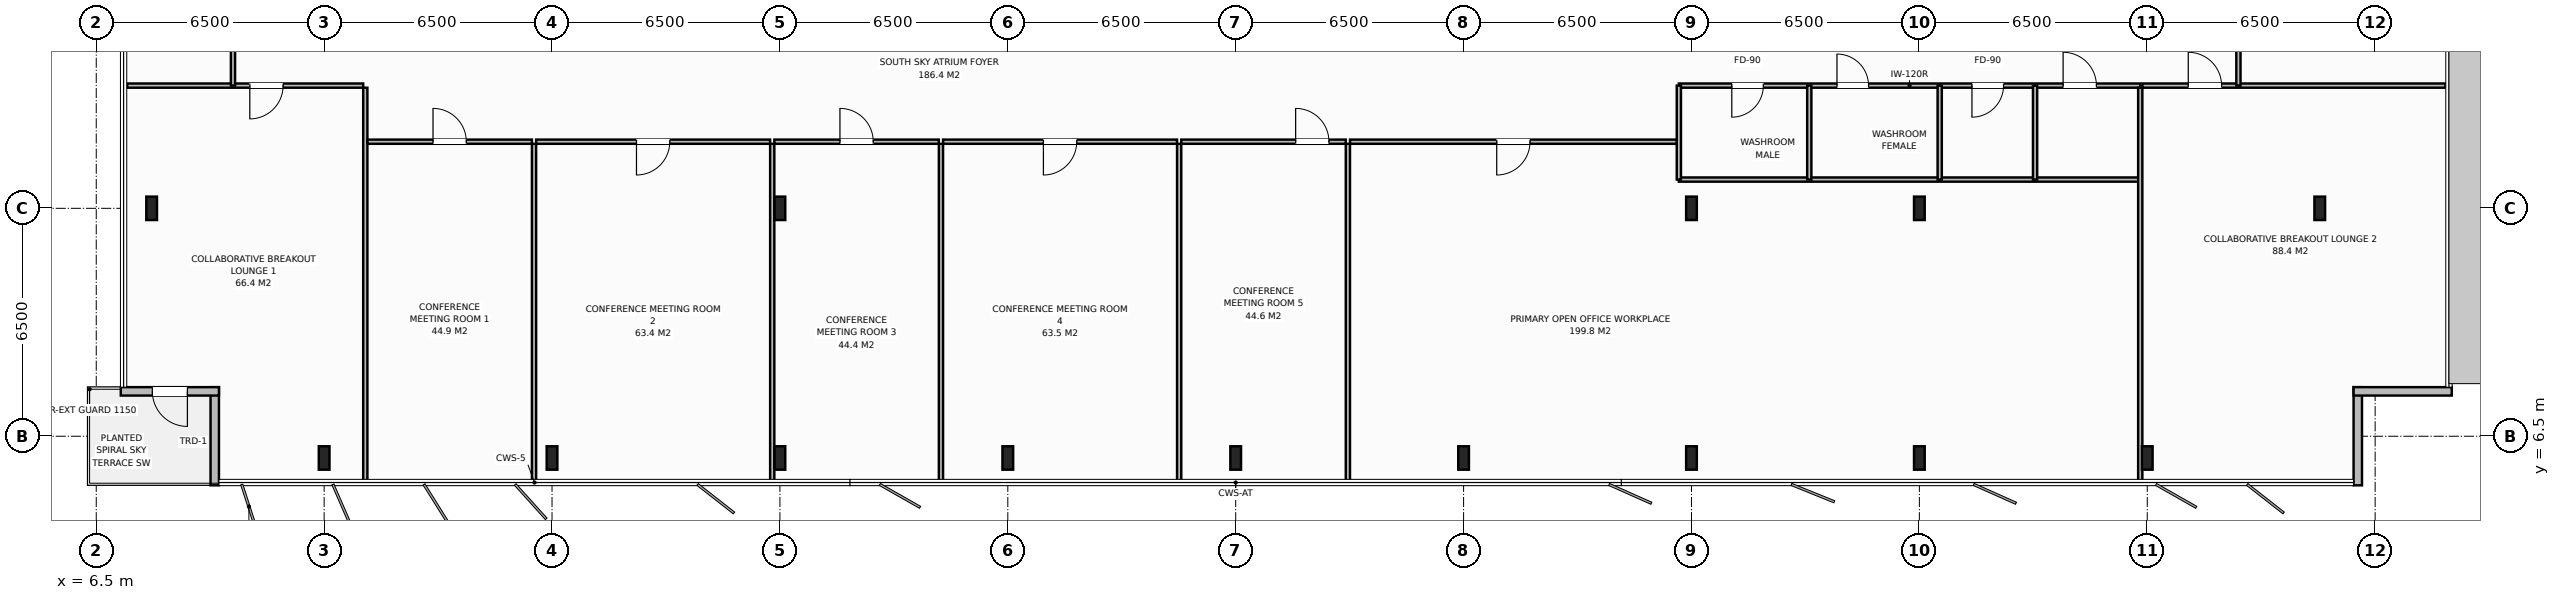
"""IFC4 building model, lengths in metres.
Left out: names, types, materials, properties, quantities, classifications, styles, units other than length and angle.
Written with IfcOpenShell. Run it as: python <this file> out.ifc"""

import sys

from ifc_helpers import new_model, si_unit, direction, frame, frame_2d, origin, origin_2d, place, context, subcontext, project, spatial, rectangle, i_section, extrude, element, fill, save


model = new_model("IFC4")
c1 = context("Model", 3, precision=1e-05, world=origin(), true_north=direction((0.0, 1.0)))
c2 = subcontext(c1, "Body", "Model", "MODEL_VIEW")
j1 = project(units=[si_unit("LENGTHUNIT", "METRE"), si_unit("PLANEANGLEUNIT", "RADIAN")], contexts=[c1])
p1 = place(None, origin())
s1 = spatial("IfcSite", under=j1, at=p1, CompositionType="ELEMENT")
p2 = place(p1, origin())
s2 = spatial("IfcBuilding", under=s1, at=p2, CompositionType="ELEMENT")
p3 = place(p2, frame((0.0, 0.0, 294.4)))
s3 = spatial("IfcBuildingStorey", under=s2, at=p3, CompositionType="ELEMENT", Elevation=294.4)
for number, where, z_axis, x_axis in (
    (1, (58.5, 13.0, 0.0), (0.0, 0.0, 1.0), (1.0, 0.0, 0.0)),
    (2, (26.0, 13.0, 0.0), (0.0, 0.0, 1.0), (1.0, 0.0, 0.0)),
    (3, (52.0, 13.0, 0.0), (0.0, 0.0, 1.0), (1.0, 0.0, 0.0)),
    (4, (13.0, 5.88, 0.0), (0.0, 0.0, 1.0), (1.0, 0.0, 0.0)),
    (5, (19.5, 5.88, 0.0), (0.0, 0.0, 1.0), (1.0, 0.0, 0.0)),
    (6, (26.0, 5.88, 0.0), (0.0, 0.0, 1.0), (1.0, 0.0, 0.0)),
    (7, (32.5, 5.88, 0.0), (0.0, 0.0, 1.0), (1.0, 0.0, 0.0)),
    (8, (39.0, 5.88, 0.0), (0.0, 0.0, 1.0), (1.0, 0.0, 0.0)),
    (9, (45.5, 5.88, 0.0), (0.0, 0.0, 1.0), (1.0, 0.0, 0.0)),
    (10, (52.0, 5.88, 0.0), (0.0, 0.0, 1.0), (1.0, 0.0, 0.0)),
    (11, (58.5, 5.88, 0.0), (0.0, 0.0, 1.0), (1.0, 0.0, 0.0)),
    (12, (65.0, 5.88, 0.0), (0.0, 0.0, 1.0), (1.0, 0.0, 0.0)),
    (13, (8.08, 13.0, 0.0), (0.0, 0.0, 1.0), (1.0, 0.0, 0.0)),
    (14, (69.92, 13.0, 0.0), (0.0, 0.0, 1.0), (1.0, 0.0, 0.0)),
):
    element("IfcColumn", number, at=place(p3, frame(where, z_axis=z_axis, x_axis=x_axis)), inside=s3, PredefinedType="COLUMN", context=c2, shape_type="SweptSolid", body=[
        extrude(i_section(OverallWidth=0.305, OverallDepth=0.668, WebThickness=0.021, FlangeThickness=0.04, at=origin_2d()), origin(), (0.0, 0.0, 1.0), 4.0),
    ])
p4 = place(p3, frame((9.88, 5.1, 0.0), z_axis=(0.0, 0.0, 1.0), x_axis=(0.0, 1.0, 0.0)))
e15 = element("IfcWall", 15, at=p4, inside=s3, PredefinedType="STANDARD", context=c2, shape_type="SweptSolid", body=[
    extrude(rectangle(XDim=2.8, YDim=0.24, at=frame_2d((1.4, 0.0))), origin(), (0.0, 0.0, 1.0), 3.788),
])
p5 = place(p3, frame((10.0, 7.78, 0.0), z_axis=(0.0, 0.0, 1.0), x_axis=(-1.0, 0.0, 0.0)))
e16 = element("IfcWall", 16, at=p5, inside=s3, PredefinedType="STANDARD", context=c2, shape_type="SweptSolid", body=[
    extrude(rectangle(XDim=2.8, YDim=0.24, at=frame_2d((1.4, 0.0))), origin(), (0.0, 0.0, 1.0), 3.788),
])
p6 = place(p5, frame((0.9, 0.0, 0.0)))
e17 = element("IfcOpeningElement", 17, at=p6, cuts=e16, PredefinedType="OPENING", context=c2, shape_type="SweptSolid", body=[
    extrude(rectangle(XDim=1.0, YDim=2.2, at=frame_2d((0.5, 1.1))), frame((0.0, 0.13, 0.0), z_axis=(0.0, -1.0, 0.0), x_axis=(1.0, 0.0, 0.0)), (0.0, 0.0, 1.0), 0.26),
])
p7 = place(p3, frame((71.005, 7.9, 0.0), z_axis=(0.0, 0.0, 1.0), x_axis=(0.0, -1.0, 0.0)))
e18 = element("IfcWall", 18, at=p7, inside=s3, PredefinedType="STANDARD", context=c2, shape_type="SweptSolid", body=[
    extrude(rectangle(XDim=2.8, YDim=0.24, at=frame_2d((1.4, 0.0))), origin(), (0.0, 0.0, 1.0), 3.788),
])
p8 = place(p3, frame((73.685, 7.78, 0.0), z_axis=(0.0, 0.0, 1.0), x_axis=(-1.0, 0.0, 0.0)))
e19 = element("IfcWall", 19, at=p8, inside=s3, PredefinedType="STANDARD", context=c2, shape_type="SweptSolid", body=[
    extrude(rectangle(XDim=2.8, YDim=0.24, at=frame_2d((1.4, 0.0))), origin(), (0.0, 0.0, 1.0), 3.788),
])
p9 = place(p3, frame((51.64, 16.5, 0.0), z_axis=(0.0, 0.0, 1.0), x_axis=(1.0, 0.0, 0.0)))
e20 = element("IfcWall", 20, at=p9, inside=s3, PredefinedType="PARTITIONING", context=c2, shape_type="SweptSolid", body=[
    extrude(rectangle(XDim=13.16, YDim=0.12, at=frame_2d((6.58, 0.0))), origin(), (0.0, 0.0, 1.0), 3.788),
])
p10 = place(p9, frame((1.51, 0.0, 0.0)))
e21 = element("IfcOpeningElement", 21, at=p10, cuts=e20, PredefinedType="OPENING", context=c2, shape_type="SweptSolid", body=[
    extrude(rectangle(XDim=0.9, YDim=2.15, at=frame_2d((0.45, 1.075))), frame((0.0, 0.07, 0.0), z_axis=(0.0, -1.0, 0.0), x_axis=(1.0, 0.0, 0.0)), (0.0, 0.0, 1.0), 0.14),
])
p11 = place(p9, frame((4.51, 0.0, 0.0)))
e22 = element("IfcOpeningElement", 22, at=p11, cuts=e20, PredefinedType="OPENING", context=c2, shape_type="SweptSolid", body=[
    extrude(rectangle(XDim=0.9, YDim=2.15, at=frame_2d((0.45, 1.075))), frame((0.0, 0.07, 0.0), z_axis=(0.0, -1.0, 0.0), x_axis=(1.0, 0.0, 0.0)), (0.0, 0.0, 1.0), 0.14),
])
p12 = place(p9, frame((8.36, 0.0, 0.0)))
e23 = element("IfcOpeningElement", 23, at=p12, cuts=e20, PredefinedType="OPENING", context=c2, shape_type="SweptSolid", body=[
    extrude(rectangle(XDim=0.9, YDim=2.15, at=frame_2d((0.45, 1.075))), frame((0.0, 0.07, 0.0), z_axis=(0.0, -1.0, 0.0), x_axis=(1.0, 0.0, 0.0)), (0.0, 0.0, 1.0), 0.14),
])
p13 = place(p9, frame((10.96, 0.0, 0.0)))
e24 = element("IfcOpeningElement", 24, at=p13, cuts=e20, PredefinedType="OPENING", context=c2, shape_type="SweptSolid", body=[
    extrude(rectangle(XDim=0.95, YDim=2.15, at=frame_2d((0.475, 1.075))), frame((0.0, 0.07, 0.0), z_axis=(0.0, -1.0, 0.0), x_axis=(1.0, 0.0, 0.0)), (0.0, 0.0, 1.0), 0.14),
])
p14 = place(p3, frame((51.64, 13.82, 0.0), z_axis=(0.0, 0.0, 1.0), x_axis=(1.0, 0.0, 0.0)))
e25 = element("IfcWall", 25, at=p14, inside=s3, PredefinedType="PARTITIONING", context=c2, shape_type="SweptSolid", body=[
    extrude(rectangle(XDim=13.16, YDim=0.12, at=frame_2d((6.58, 0.0))), origin(), (0.0, 0.0, 1.0), 3.788),
])
for number, where, z_axis, x_axis in (
    (26, (51.64, 13.82, 0.0), (0.0, 0.0, 1.0), (0.0, 1.0, 0.0)),
    (27, (55.36, 13.82, 0.0), (0.0, 0.0, 1.0), (0.0, 1.0, 0.0)),
    (28, (59.08, 13.82, 0.0), (0.0, 0.0, 1.0), (0.0, 1.0, 0.0)),
    (29, (61.8, 13.82, 0.0), (0.0, 0.0, 1.0), (0.0, 1.0, 0.0)),
):
    element("IfcWall", number, at=place(p3, frame(where, z_axis=z_axis, x_axis=x_axis)), inside=s3, PredefinedType="PARTITIONING", context=c2, shape_type="SweptSolid", body=[
        extrude(rectangle(XDim=2.68, YDim=0.12, at=frame_2d((1.34, 0.0))), origin(), (0.0, 0.0, 1.0), 3.788),
    ])
p15 = place(p3, frame((14.174, 5.12, 0.0), z_axis=(0.0, 0.0, 1.0), x_axis=(0.0, 1.0, 0.0)))
e30 = element("IfcWall", 30, at=p15, inside=s3, PredefinedType="PARTITIONING", context=c2, shape_type="SweptSolid", body=[
    extrude(rectangle(XDim=11.32, YDim=0.12, at=frame_2d((5.66, 0.0))), origin(), (0.0, 0.0, 1.0), 3.788),
])
p16 = place(p3, frame((7.38, 16.5, 0.0), z_axis=(0.0, 0.0, 1.0), x_axis=(1.0, 0.0, 0.0)))
e31 = element("IfcWall", 31, at=p16, inside=s3, PredefinedType="PARTITIONING", context=c2, shape_type="SweptSolid", body=[
    extrude(rectangle(XDim=6.734, YDim=0.12, at=frame_2d((3.367, 0.0))), origin(), (0.0, 0.0, 1.0), 3.788),
])
p17 = place(p16, frame((3.5, 0.0, 0.0)))
e32 = element("IfcOpeningElement", 32, at=p17, cuts=e31, PredefinedType="OPENING", context=c2, shape_type="SweptSolid", body=[
    extrude(rectangle(XDim=0.95, YDim=2.15, at=frame_2d((0.475, 1.075))), frame((0.0, 0.07, 0.0), z_axis=(0.0, -1.0, 0.0), x_axis=(1.0, 0.0, 0.0)), (0.0, 0.0, 1.0), 0.14),
])
p18 = place(p3, frame((18.987, 5.12, 0.0), z_axis=(0.0, 0.0, 1.0), x_axis=(0.0, 1.0, 0.0)))
e33 = element("IfcWall", 33, at=p18, inside=s3, PredefinedType="PARTITIONING", context=c2, shape_type="SweptSolid", body=[
    extrude(rectangle(XDim=9.72, YDim=0.12, at=frame_2d((4.86, 0.0))), origin(), (0.0, 0.0, 1.0), 3.788),
])
p19 = place(p3, frame((14.234, 14.9, 0.0), z_axis=(0.0, 0.0, 1.0), x_axis=(1.0, 0.0, 0.0)))
e34 = element("IfcWall", 34, at=p19, inside=s3, PredefinedType="PARTITIONING", context=c2, shape_type="SweptSolid", body=[
    extrude(rectangle(XDim=4.693, YDim=0.12, at=frame_2d((2.346, 0.0))), origin(), (0.0, 0.0, 1.0), 3.788),
])
p20 = place(p19, frame((1.871, 0.0, 0.0)))
e35 = element("IfcOpeningElement", 35, at=p20, cuts=e34, PredefinedType="OPENING", context=c2, shape_type="SweptSolid", body=[
    extrude(rectangle(XDim=0.95, YDim=2.15, at=frame_2d((0.475, 1.075))), frame((0.0, 0.07, 0.0), z_axis=(0.0, -1.0, 0.0), x_axis=(1.0, 0.0, 0.0)), (0.0, 0.0, 1.0), 0.14),
])
p21 = place(p3, frame((25.781, 5.12, 0.0), z_axis=(0.0, 0.0, 1.0), x_axis=(0.0, 1.0, 0.0)))
e36 = element("IfcWall", 36, at=p21, inside=s3, PredefinedType="PARTITIONING", context=c2, shape_type="SweptSolid", body=[
    extrude(rectangle(XDim=9.72, YDim=0.12, at=frame_2d((4.86, 0.0))), origin(), (0.0, 0.0, 1.0), 2.988),
])
p22 = place(p3, frame((19.047, 14.9, 0.0), z_axis=(0.0, 0.0, 1.0), x_axis=(1.0, 0.0, 0.0)))
e37 = element("IfcWall", 37, at=p22, inside=s3, PredefinedType="PARTITIONING", context=c2, shape_type="SweptSolid", body=[
    extrude(rectangle(XDim=6.674, YDim=0.12, at=frame_2d((3.337, 0.0))), origin(), (0.0, 0.0, 1.0), 3.788),
])
p23 = place(p22, frame((2.862, 0.0, 0.0)))
e38 = element("IfcOpeningElement", 38, at=p23, cuts=e37, PredefinedType="OPENING", context=c2, shape_type="SweptSolid", body=[
    extrude(rectangle(XDim=0.95, YDim=2.15, at=frame_2d((0.475, 1.075))), frame((0.0, 0.07, 0.0), z_axis=(0.0, -1.0, 0.0), x_axis=(1.0, 0.0, 0.0)), (0.0, 0.0, 1.0), 0.14),
])
p24 = place(p3, frame((30.593, 5.12, 0.0), z_axis=(0.0, 0.0, 1.0), x_axis=(0.0, 1.0, 0.0)))
e39 = element("IfcWall", 39, at=p24, inside=s3, PredefinedType="PARTITIONING", context=c2, shape_type="SweptSolid", body=[
    extrude(rectangle(XDim=9.72, YDim=0.12, at=frame_2d((4.86, 0.0))), origin(), (0.0, 0.0, 1.0), 3.788),
])
p25 = place(p3, frame((25.841, 14.9, 0.0), z_axis=(0.0, 0.0, 1.0), x_axis=(1.0, 0.0, 0.0)))
e40 = element("IfcWall", 40, at=p25, inside=s3, PredefinedType="PARTITIONING", context=c2, shape_type="SweptSolid", body=[
    extrude(rectangle(XDim=4.692, YDim=0.12, at=frame_2d((2.346, 0.0))), origin(), (0.0, 0.0, 1.0), 3.788),
])
p26 = place(p25, frame((1.871, 0.0, 0.0)))
e41 = element("IfcOpeningElement", 41, at=p26, cuts=e40, PredefinedType="OPENING", context=c2, shape_type="SweptSolid", body=[
    extrude(rectangle(XDim=0.95, YDim=2.15, at=frame_2d((0.475, 1.075))), frame((0.0, 0.07, 0.0), z_axis=(0.0, -1.0, 0.0), x_axis=(1.0, 0.0, 0.0)), (0.0, 0.0, 1.0), 0.14),
])
p27 = place(p3, frame((37.387, 5.12, 0.0), z_axis=(0.0, 0.0, 1.0), x_axis=(0.0, 1.0, 0.0)))
e42 = element("IfcWall", 42, at=p27, inside=s3, PredefinedType="PARTITIONING", context=c2, shape_type="SweptSolid", body=[
    extrude(rectangle(XDim=9.72, YDim=0.12, at=frame_2d((4.86, 0.0))), origin(), (0.0, 0.0, 1.0), 3.788),
])
p28 = place(p3, frame((30.653, 14.9, 0.0), z_axis=(0.0, 0.0, 1.0), x_axis=(1.0, 0.0, 0.0)))
e43 = element("IfcWall", 43, at=p28, inside=s3, PredefinedType="PARTITIONING", context=c2, shape_type="SweptSolid", body=[
    extrude(rectangle(XDim=6.674, YDim=0.12, at=frame_2d((3.337, 0.0))), origin(), (0.0, 0.0, 1.0), 3.788),
])
p29 = place(p28, frame((2.862, 0.0, 0.0)))
e44 = element("IfcOpeningElement", 44, at=p29, cuts=e43, PredefinedType="OPENING", context=c2, shape_type="SweptSolid", body=[
    extrude(rectangle(XDim=0.95, YDim=2.15, at=frame_2d((0.475, 1.075))), frame((0.0, 0.07, 0.0), z_axis=(0.0, -1.0, 0.0), x_axis=(1.0, 0.0, 0.0)), (0.0, 0.0, 1.0), 0.14),
])
p30 = place(p3, frame((42.2, 5.12, 0.0), z_axis=(0.0, 0.0, 1.0), x_axis=(0.0, 1.0, 0.0)))
e45 = element("IfcWall", 45, at=p30, inside=s3, PredefinedType="PARTITIONING", context=c2, shape_type="SweptSolid", body=[
    extrude(rectangle(XDim=9.72, YDim=0.12, at=frame_2d((4.86, 0.0))), origin(), (0.0, 0.0, 1.0), 3.788),
])
p31 = place(p3, frame((37.448, 14.9, 0.0), z_axis=(0.0, 0.0, 1.0), x_axis=(1.0, 0.0, 0.0)))
e46 = element("IfcWall", 46, at=p31, inside=s3, PredefinedType="PARTITIONING", context=c2, shape_type="SweptSolid", body=[
    extrude(rectangle(XDim=4.692, YDim=0.12, at=frame_2d((2.346, 0.0))), origin(), (0.0, 0.0, 1.0), 3.788),
])
p32 = place(p31, frame((3.262, 0.0, 0.0)))
e47 = element("IfcOpeningElement", 47, at=p32, cuts=e46, PredefinedType="OPENING", context=c2, shape_type="SweptSolid", body=[
    extrude(rectangle(XDim=0.95, YDim=2.15, at=frame_2d((0.475, 1.075))), frame((0.0, 0.07, 0.0), z_axis=(0.0, -1.0, 0.0), x_axis=(1.0, 0.0, 0.0)), (0.0, 0.0, 1.0), 0.14),
])
p33 = place(p3, frame((64.8, 5.12, 0.0), z_axis=(0.0, 0.0, 1.0), x_axis=(0.0, 1.0, 0.0)))
e48 = element("IfcWall", 48, at=p33, inside=s3, PredefinedType="PARTITIONING", context=c2, shape_type="SweptSolid", body=[
    extrude(rectangle(XDim=11.32, YDim=0.12, at=frame_2d((5.66, 0.0))), origin(), (0.0, 0.0, 1.0), 2.988),
])
p34 = place(p3, frame((42.26, 14.9, 0.0), z_axis=(0.0, 0.0, 1.0), x_axis=(1.0, 0.0, 0.0)))
e49 = element("IfcWall", 49, at=p34, inside=s3, PredefinedType="PARTITIONING", context=c2, shape_type="SweptSolid", body=[
    extrude(rectangle(XDim=9.32, YDim=0.12, at=frame_2d((4.66, 0.0))), origin(), (0.0, 0.0, 1.0), 3.788),
])
p35 = place(p34, frame((4.185, 0.0, 0.0)))
e50 = element("IfcOpeningElement", 50, at=p35, cuts=e49, PredefinedType="OPENING", context=c2, shape_type="SweptSolid", body=[
    extrude(rectangle(XDim=0.95, YDim=2.15, at=frame_2d((0.475, 1.075))), frame((0.0, 0.07, 0.0), z_axis=(0.0, -1.0, 0.0), x_axis=(1.0, 0.0, 0.0)), (0.0, 0.0, 1.0), 0.14),
])
p36 = place(p3, frame((64.86, 16.5, 0.0), z_axis=(0.0, 0.0, 1.0), x_axis=(1.0, 0.0, 0.0)))
e51 = element("IfcWall", 51, at=p36, inside=s3, PredefinedType="PARTITIONING", context=c2, shape_type="SweptSolid", body=[
    extrude(rectangle(XDim=8.645, YDim=0.12, at=frame_2d((4.322, 0.0))), origin(), (0.0, 0.0, 1.0), 3.788),
])
p37 = place(p36, frame((1.31, 0.0, 0.0)))
e52 = element("IfcOpeningElement", 52, at=p37, cuts=e51, PredefinedType="OPENING", context=c2, shape_type="SweptSolid", body=[
    extrude(rectangle(XDim=0.95, YDim=2.15, at=frame_2d((0.475, 1.075))), frame((0.0, 0.07, 0.0), z_axis=(0.0, -1.0, 0.0), x_axis=(1.0, 0.0, 0.0)), (0.0, 0.0, 1.0), 0.14),
])
p38 = place(p3, frame((10.4, 16.5, 0.0), z_axis=(0.0, 0.0, 1.0), x_axis=(0.0, 1.0, 0.0)))
e53 = element("IfcWall", 53, at=p38, inside=s3, PredefinedType="PARTITIONING", context=c2, shape_type="SweptSolid", body=[
    extrude(rectangle(XDim=6.333, YDim=0.12, at=frame_2d((3.167, 0.0))), origin(), (0.0, 0.0, 1.0), 3.788),
])
p39 = place(p38, frame((3.742, 0.0, 0.0)))
e54 = element("IfcOpeningElement", 54, at=p39, cuts=e53, PredefinedType="OPENING", context=c2, shape_type="SweptSolid", body=[
    extrude(rectangle(XDim=0.95, YDim=2.15, at=frame_2d((0.475, 1.075))), frame((0.0, 0.07, 0.0), z_axis=(0.0, -1.0, 0.0), x_axis=(1.0, 0.0, 0.0)), (0.0, 0.0, 1.0), 0.14),
])
p40 = place(p3, frame((67.6, 16.5, 0.0), z_axis=(0.0, 0.0, 1.0), x_axis=(0.0, 1.0, 0.0)))
e55 = element("IfcWall", 55, at=p40, inside=s3, PredefinedType="PARTITIONING", context=c2, shape_type="SweptSolid", body=[
    extrude(rectangle(XDim=16.9, YDim=0.12, at=frame_2d((8.45, 0.0))), origin(), (0.0, 0.0, 1.0), 3.788),
])
p41 = place(p40, frame((9.025, 0.0, 0.0)))
e56 = element("IfcOpeningElement", 56, at=p41, cuts=e55, PredefinedType="OPENING", context=c2, shape_type="SweptSolid", body=[
    extrude(rectangle(XDim=0.95, YDim=2.15, at=frame_2d((0.475, 1.075))), frame((0.0, 0.07, 0.0), z_axis=(0.0, -1.0, 0.0), x_axis=(1.0, 0.0, 0.0)), (0.0, 0.0, 1.0), 0.14),
])
p42 = place(p6, origin())
e57 = element("IfcDoor", 57, at=p42, inside=s3, OperationType="SINGLE_SWING_LEFT", PredefinedType="DOOR", context=c2, shape_type="SweptSolid", body=[
    extrude(rectangle(XDim=1.0, YDim=2.2, at=frame_2d((0.5, 1.1))), frame((0.0, 0.025, 0.0), z_axis=(0.0, -1.0, 0.0), x_axis=(1.0, 0.0, 0.0)), (0.0, 0.0, 1.0), 0.05),
])
fill(e17, e57)
p43 = place(p10, origin())
e58 = element("IfcDoor", 58, at=p43, inside=s3, OperationType="SINGLE_SWING_RIGHT", PredefinedType="DOOR", context=c2, shape_type="SweptSolid", body=[
    extrude(rectangle(XDim=0.9, YDim=2.15, at=frame_2d((0.45, 1.075))), frame((0.0, 0.025, 0.0), z_axis=(0.0, -1.0, 0.0), x_axis=(1.0, 0.0, 0.0)), (0.0, 0.0, 1.0), 0.05),
])
fill(e21, e58)
p44 = place(p11, origin())
e59 = element("IfcDoor", 59, at=p44, inside=s3, OperationType="SINGLE_SWING_LEFT", PredefinedType="DOOR", context=c2, shape_type="SweptSolid", body=[
    extrude(rectangle(XDim=0.9, YDim=2.15, at=frame_2d((0.45, 1.075))), frame((0.0, 0.025, 0.0), z_axis=(0.0, -1.0, 0.0), x_axis=(1.0, 0.0, 0.0)), (0.0, 0.0, 1.0), 0.05),
])
fill(e22, e59)
p45 = place(p12, origin())
e60 = element("IfcDoor", 60, at=p45, inside=s3, OperationType="SINGLE_SWING_RIGHT", PredefinedType="DOOR", context=c2, shape_type="SweptSolid", body=[
    extrude(rectangle(XDim=0.9, YDim=2.15, at=frame_2d((0.45, 1.075))), frame((0.0, 0.025, 0.0), z_axis=(0.0, -1.0, 0.0), x_axis=(1.0, 0.0, 0.0)), (0.0, 0.0, 1.0), 0.05),
])
fill(e23, e60)
p46 = place(p13, origin())
e61 = element("IfcDoor", 61, at=p46, inside=s3, OperationType="SINGLE_SWING_LEFT", PredefinedType="DOOR", context=c2, shape_type="SweptSolid", body=[
    extrude(rectangle(XDim=0.95, YDim=2.15, at=frame_2d((0.475, 1.075))), frame((0.0, 0.025, 0.0), z_axis=(0.0, -1.0, 0.0), x_axis=(1.0, 0.0, 0.0)), (0.0, 0.0, 1.0), 0.05),
])
fill(e24, e61)
p47 = place(p17, origin())
e62 = element("IfcDoor", 62, at=p47, inside=s3, OperationType="SINGLE_SWING_RIGHT", PredefinedType="DOOR", context=c2, shape_type="SweptSolid", body=[
    extrude(rectangle(XDim=0.95, YDim=2.15, at=frame_2d((0.475, 1.075))), frame((0.0, 0.025, 0.0), z_axis=(0.0, -1.0, 0.0), x_axis=(1.0, 0.0, 0.0)), (0.0, 0.0, 1.0), 0.05),
])
fill(e32, e62)
p48 = place(p20, origin())
e63 = element("IfcDoor", 63, at=p48, inside=s3, OperationType="SINGLE_SWING_LEFT", PredefinedType="DOOR", context=c2, shape_type="SweptSolid", body=[
    extrude(rectangle(XDim=0.95, YDim=2.15, at=frame_2d((0.475, 1.075))), frame((0.0, 0.025, 0.0), z_axis=(0.0, -1.0, 0.0), x_axis=(1.0, 0.0, 0.0)), (0.0, 0.0, 1.0), 0.05),
])
fill(e35, e63)
p49 = place(p23, origin())
e64 = element("IfcDoor", 64, at=p49, inside=s3, OperationType="SINGLE_SWING_RIGHT", PredefinedType="DOOR", context=c2, shape_type="SweptSolid", body=[
    extrude(rectangle(XDim=0.95, YDim=2.15, at=frame_2d((0.475, 1.075))), frame((0.0, 0.025, 0.0), z_axis=(0.0, -1.0, 0.0), x_axis=(1.0, 0.0, 0.0)), (0.0, 0.0, 1.0), 0.05),
])
fill(e38, e64)
p50 = place(p26, origin())
e65 = element("IfcDoor", 65, at=p50, inside=s3, OperationType="SINGLE_SWING_LEFT", PredefinedType="DOOR", context=c2, shape_type="SweptSolid", body=[
    extrude(rectangle(XDim=0.95, YDim=2.15, at=frame_2d((0.475, 1.075))), frame((0.0, 0.025, 0.0), z_axis=(0.0, -1.0, 0.0), x_axis=(1.0, 0.0, 0.0)), (0.0, 0.0, 1.0), 0.05),
])
fill(e41, e65)
p51 = place(p29, origin())
e66 = element("IfcDoor", 66, at=p51, inside=s3, OperationType="SINGLE_SWING_RIGHT", PredefinedType="DOOR", context=c2, shape_type="SweptSolid", body=[
    extrude(rectangle(XDim=0.95, YDim=2.15, at=frame_2d((0.475, 1.075))), frame((0.0, 0.025, 0.0), z_axis=(0.0, -1.0, 0.0), x_axis=(1.0, 0.0, 0.0)), (0.0, 0.0, 1.0), 0.05),
])
fill(e44, e66)
p52 = place(p32, origin())
e67 = element("IfcDoor", 67, at=p52, inside=s3, OperationType="SINGLE_SWING_LEFT", PredefinedType="DOOR", context=c2, shape_type="SweptSolid", body=[
    extrude(rectangle(XDim=0.95, YDim=2.15, at=frame_2d((0.475, 1.075))), frame((0.0, 0.025, 0.0), z_axis=(0.0, -1.0, 0.0), x_axis=(1.0, 0.0, 0.0)), (0.0, 0.0, 1.0), 0.05),
])
fill(e47, e67)
p53 = place(p35, origin())
e68 = element("IfcDoor", 68, at=p53, inside=s3, OperationType="SINGLE_SWING_RIGHT", PredefinedType="DOOR", context=c2, shape_type="SweptSolid", body=[
    extrude(rectangle(XDim=0.95, YDim=2.15, at=frame_2d((0.475, 1.075))), frame((0.0, 0.025, 0.0), z_axis=(0.0, -1.0, 0.0), x_axis=(1.0, 0.0, 0.0)), (0.0, 0.0, 1.0), 0.05),
])
fill(e50, e68)
p54 = place(p37, origin())
e69 = element("IfcDoor", 69, at=p54, inside=s3, OperationType="SINGLE_SWING_LEFT", PredefinedType="DOOR", context=c2, shape_type="SweptSolid", body=[
    extrude(rectangle(XDim=0.95, YDim=2.15, at=frame_2d((0.475, 1.075))), frame((0.0, 0.025, 0.0), z_axis=(0.0, -1.0, 0.0), x_axis=(1.0, 0.0, 0.0)), (0.0, 0.0, 1.0), 0.05),
])
fill(e52, e69)
save(model, sys.argv[1])
